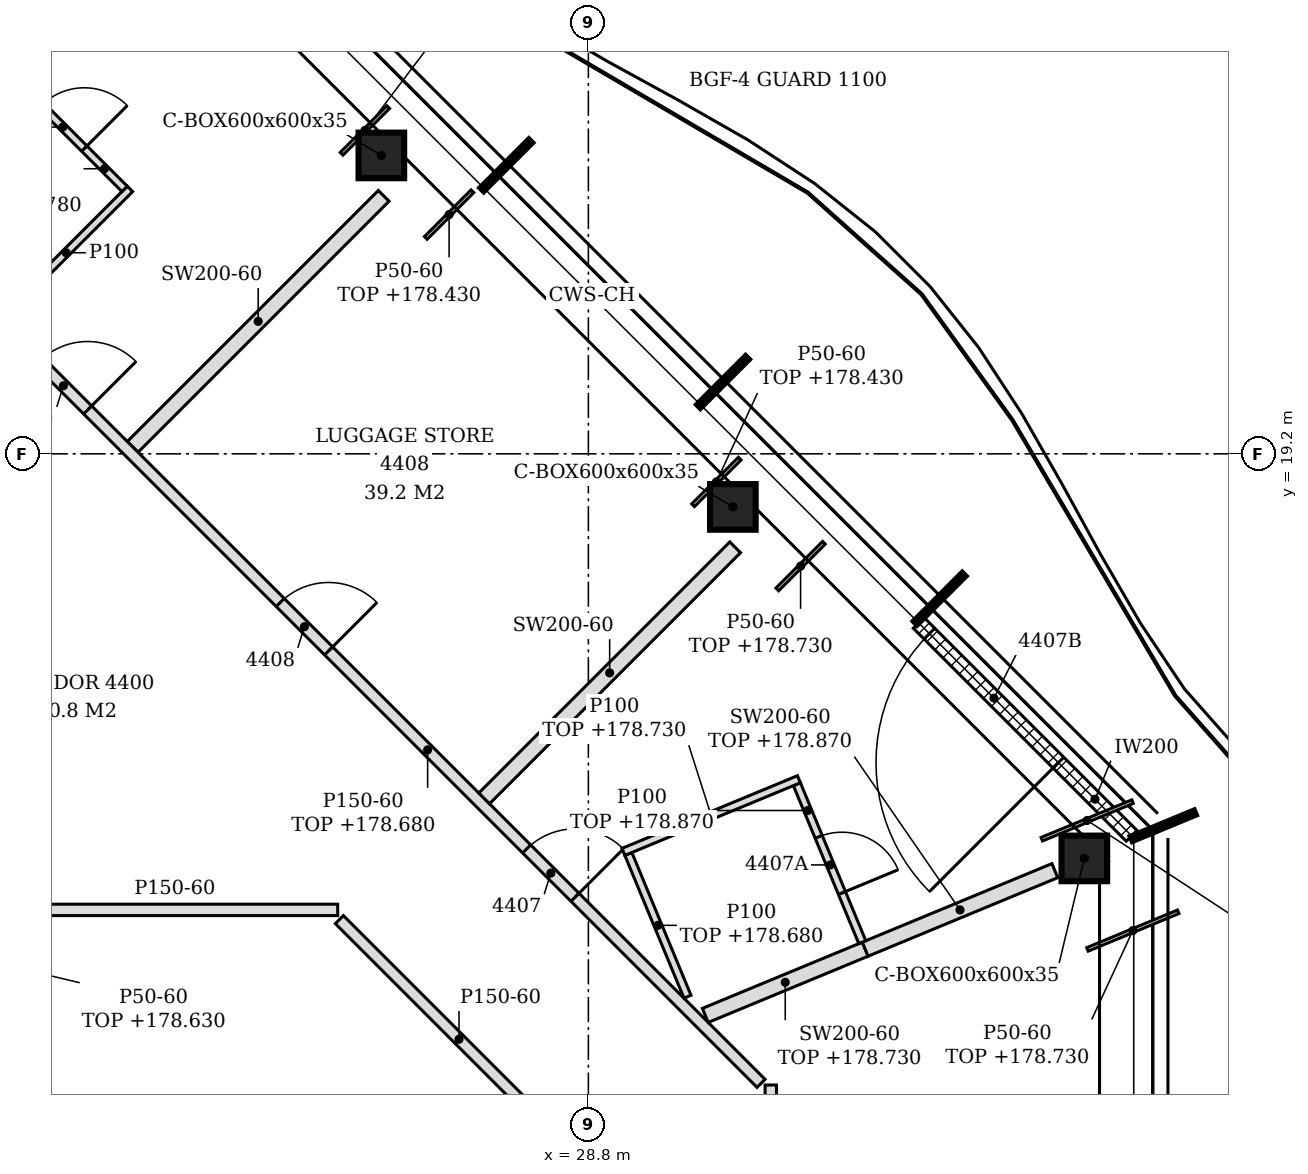
"""IFC4 building model, lengths in metres.
Left out: names, types, materials, properties, quantities, classifications, styles, units other than length and angle.
Written with IfcOpenShell. Run it as: python <this file> out.ifc"""

import sys

from ifc_helpers import new_model, si_unit, direction, frame, frame_2d, origin, origin_2d, place, context, subcontext, project, spatial, rectangle, hollow_rectangle, extrude, clip, halfspace, element, fill, save


model = new_model("IFC4")
c1 = context("Model", 3, precision=1e-05, world=origin(), true_north=direction((0.0, 1.0)))
c2 = subcontext(c1, "Body", "Model", "MODEL_VIEW")
j1 = project(units=[si_unit("LENGTHUNIT", "METRE"), si_unit("PLANEANGLEUNIT", "RADIAN")], contexts=[c1])
p1 = place(None, origin())
s1 = spatial("IfcSite", under=j1, at=p1, CompositionType="ELEMENT")
p2 = place(p1, origin())
s2 = spatial("IfcBuilding", under=s1, at=p2, CompositionType="ELEMENT")
p3 = place(p2, frame((0.0, 0.0, 175.8)))
s3 = spatial("IfcBuildingStorey", under=s2, at=p3, CompositionType="ELEMENT", Elevation=175.8)
for number, where, z_axis, x_axis in (
    (1, (35.325, 13.877, -0.15), (0.183, -0.122, 0.976), (0.555, 0.832, 0.0)),
    (2, (30.701, 18.501, -0.15), (0.183, -0.122, 0.976), (0.555, 0.832, 0.0)),
    (3, (26.076, 23.126, -0.15), (0.183, -0.122, 0.976), (0.555, 0.832, 0.0)),
):
    element("IfcColumn", number, at=place(p3, frame(where, z_axis=z_axis, x_axis=x_axis)), inside=s3, PredefinedType="COLUMN", context=c2, shape_type="Clipping", body=[
        clip(clip(extrude(hollow_rectangle(XDim=0.6, YDim=0.6, WallThickness=0.035, at=origin_2d()), origin(), (0.0, 0.0, 1.0), 3.69), halfspace(frame((0.0, 0.0, 0.022), z_axis=(0.0, 0.0, 1.0), x_axis=(1.0, 0.0, 0.0)), True)), halfspace(frame((0.0, 0.0, 3.67), z_axis=(0.0, 0.0, 1.0), x_axis=(1.0, 0.0, 0.0)), False)),
    ])
p4 = place(p3, frame((35.947, 14.175, 0.0), z_axis=(0.0, 0.0, 1.0), x_axis=(-0.707137595296, 0.707075965734, 0.0)))
e4 = element("IfcWall", 4, at=p4, inside=s3, PredefinedType="NOTDEFINED", context=c2, shape_type="SweptSolid", body=[
    extrude(rectangle(XDim=3.961, YDim=0.2, at=frame_2d((1.981, 0.0))), origin(), (0.0, 0.0, 1.0), 3.45),
])
p5 = place(p4, frame((1.362, 0.0, 0.0)))
e5 = element("IfcOpeningElement", 5, at=p5, cuts=e4, PredefinedType="OPENING", context=c2, shape_type="SweptSolid", body=[
    extrude(rectangle(XDim=2.4, YDim=2.4, at=frame_2d((1.2, 1.2))), frame((0.0, 0.11, 0.0), z_axis=(0.0, -1.0, 0.0), x_axis=(1.0, 0.0, 0.0)), (0.0, 0.0, 1.0), 0.22),
])
p6 = place(p3, frame((31.2, 9.812, 0.0), z_axis=(0.0, 0.0, 1.0), x_axis=(0.0, 1.0, 0.0)))
e6 = element("IfcWall", 6, at=p6, inside=s3, PredefinedType="PARTITIONING", context=c2, shape_type="SweptSolid", body=[
    extrude(rectangle(XDim=1.083, YDim=0.15, at=frame_2d((0.542, 0.0))), origin(), (0.0, 0.0, 1.0), 2.93),
])
p7 = place(p3, frame((28.672, 9.924, 0.0), z_axis=(0.0, 0.0, 1.0), x_axis=(-0.707134199585, 0.707079361725, 0.0)))
e7 = element("IfcWall", 7, at=p7, inside=s3, PredefinedType="PARTITIONING", context=c2, shape_type="SweptSolid", body=[
    extrude(rectangle(XDim=4.452, YDim=0.15, at=frame_2d((2.226, 0.0))), origin(), (0.0, 0.0, 1.0), 3.45),
])
p8 = place(p3, frame((31.072, 10.918, 0.0), z_axis=(0.0, 0.0, 1.0), x_axis=(-0.707106781187, 0.707106781187, 0.0)))
e8 = element("IfcWall", 8, at=p8, inside=s3, PredefinedType="PARTITIONING", context=c2, shape_type="SweptSolid", body=[
    extrude(rectangle(XDim=16.452, YDim=0.15, at=frame_2d((8.226, 0.0))), origin(), (0.0, 0.0, 1.0), 2.88),
])
p9 = place(p8, frame((3.462, 0.0, 0.0)))
e9 = element("IfcOpeningElement", 9, at=p9, cuts=e8, PredefinedType="OPENING", context=c2, shape_type="SweptSolid", body=[
    extrude(rectangle(XDim=0.9, YDim=2.1, at=frame_2d((0.45, 1.05))), frame((0.0, 0.085, 0.0), z_axis=(0.0, -1.0, 0.0), x_axis=(1.0, 0.0, 0.0)), (0.0, 0.0, 1.0), 0.17),
])
p10 = place(p8, frame((8.046, 0.0, 0.0)))
e10 = element("IfcOpeningElement", 10, at=p10, cuts=e8, PredefinedType="OPENING", context=c2, shape_type="SweptSolid", body=[
    extrude(rectangle(XDim=0.9, YDim=2.1, at=frame_2d((0.45, 1.05))), frame((0.0, 0.085, 0.0), z_axis=(0.0, -1.0, 0.0), x_axis=(1.0, 0.0, 0.0)), (0.0, 0.0, 1.0), 0.17),
])
p11 = place(p8, frame((12.53, 0.0, 0.0)))
e11 = element("IfcOpeningElement", 11, at=p11, cuts=e8, PredefinedType="OPENING", context=c2, shape_type="SweptSolid", body=[
    extrude(rectangle(XDim=0.9, YDim=2.1, at=frame_2d((0.45, 1.05))), frame((0.0, 0.085, 0.0), z_axis=(0.0, -1.0, 0.0), x_axis=(1.0, 0.0, 0.0)), (0.0, 0.0, 1.0), 0.17),
])
p12 = place(p3, frame((30.338, 11.812, 0.0), z_axis=(0.0, 0.0, 1.0), x_axis=(0.923912287373, 0.38260434556, 0.0)))
e12 = element("IfcWall", 12, at=p12, inside=s3, PredefinedType="PARTITIONING", context=c2, shape_type="SweptSolid", body=[
    extrude(rectangle(XDim=2.277, YDim=0.2, at=frame_2d((1.138, 0.0))), origin(), (0.0, 0.0, 1.0), 2.93),
])
p13 = place(p3, frame((30.104, 12.058, 0.0), z_axis=(0.0, 0.0, 1.0), x_axis=(-0.382627570994, 0.92390266907, 0.0)))
e13 = element("IfcWall", 13, at=p13, inside=s3, PredefinedType="PARTITIONING", context=c2, shape_type="SweptSolid", body=[
    extrude(rectangle(XDim=2.033, YDim=0.1, at=frame_2d((1.017, 0.0))), origin(), (0.0, 0.0, 1.0), 2.88),
])
p14 = place(p3, frame((32.442, 12.683, 0.0), z_axis=(0.0, 0.0, 1.0), x_axis=(0.923906649102, 0.382617960563, 0.0)))
e14 = element("IfcWall", 14, at=p14, inside=s3, PredefinedType="PARTITIONING", context=c2, shape_type="SweptSolid", body=[
    extrude(rectangle(XDim=2.7, YDim=0.2, at=frame_2d((1.35, 0.0))), origin(), (0.0, 0.0, 1.0), 3.07),
])
p15 = place(p3, frame((32.404, 12.775, 0.0), z_axis=(0.0, 0.0, 1.0), x_axis=(-0.382572259818, 0.923925573852, 0.0)))
e15 = element("IfcWall", 15, at=p15, inside=s3, PredefinedType="PARTITIONING", context=c2, shape_type="SweptSolid", body=[
    extrude(rectangle(XDim=2.25, YDim=0.1, at=frame_2d((1.125, 0.0))), origin(), (0.0, 0.0, 1.0), 3.07),
])
p16 = place(p15, frame((0.7, 0.0, 0.0)))
e16 = element("IfcOpeningElement", 16, at=p16, cuts=e15, PredefinedType="OPENING", context=c2, shape_type="SweptSolid", body=[
    extrude(rectangle(XDim=0.8, YDim=2.1, at=frame_2d((0.4, 1.05))), frame((0.0, 0.06, 0.0), z_axis=(0.0, -1.0, 0.0), x_axis=(1.0, 0.0, 0.0)), (0.0, 0.0, 1.0), 0.12),
])
p17 = place(p3, frame((21.215, 13.2, 0.0), z_axis=(0.0, 0.0, 1.0), x_axis=(1.0, 0.0, 0.0)))
e17 = element("IfcWall", 17, at=p17, inside=s3, PredefinedType="PARTITIONING", context=c2, shape_type="SweptSolid", body=[
    extrude(rectangle(XDim=4.287, YDim=0.15, at=frame_2d((2.144, 0.0))), origin(), (0.0, 0.0, 1.0), 3.45),
])
p18 = place(p3, frame((29.261, 13.963, 0.0), z_axis=(0.0, 0.0, 1.0), x_axis=(0.923929949387, 0.382561692574, 0.0)))
e18 = element("IfcWall", 18, at=p18, inside=s3, PredefinedType="PARTITIONING", context=c2, shape_type="SweptSolid", body=[
    extrude(rectangle(XDim=2.5, YDim=0.1, at=frame_2d((1.25, 0.0))), origin(), (0.0, 0.0, 1.0), 2.93),
])
for number, where, z_axis, x_axis in (
    (19, (27.429, 14.667, 0.0), (0.0, 0.0, 1.0), (0.707, 0.707, 0.0)),
    (20, (22.805, 19.291, 0.0), (0.0, 0.0, 1.0), (0.707, 0.707, 0.0)),
):
    element("IfcWall", number, at=place(p3, frame(where, z_axis=z_axis, x_axis=x_axis)), inside=s3, PredefinedType="PARTITIONING", context=c2, shape_type="SweptSolid", body=[
        extrude(rectangle(XDim=4.671, YDim=0.2, at=frame_2d((2.335, 0.0))), origin(), (0.0, 0.0, 1.0), 3.45),
    ])
p19 = place(p3, frame((21.09, 21.006, 0.0), z_axis=(0.0, 0.0, 1.0), x_axis=(0.707106781187, 0.707106781187, 0.0)))
e21 = element("IfcWall", 21, at=p19, inside=s3, PredefinedType="PARTITIONING", context=c2, shape_type="SweptSolid", body=[
    extrude(rectangle(XDim=2.375, YDim=0.1, at=frame_2d((1.188, 0.0))), origin(), (0.0, 0.0, 1.0), 3.45),
])
p20 = place(p3, frame((22.698, 22.685, 0.0), z_axis=(0.0, 0.0, 1.0), x_axis=(-0.707053697085, 0.707159861304, 0.0)))
e22 = element("IfcWall", 22, at=p20, inside=s3, PredefinedType="PARTITIONING", context=c2, shape_type="SweptSolid", body=[
    extrude(rectangle(XDim=2.3, YDim=0.1, at=frame_2d((1.15, 0.0))), origin(), (0.0, 0.0, 1.0), 2.98),
])
p21 = place(p20, frame((0.75, 0.0, 0.0)))
e23 = element("IfcOpeningElement", 23, at=p21, cuts=e22, PredefinedType="OPENING", context=c2, shape_type="SweptSolid", body=[
    extrude(rectangle(XDim=0.8, YDim=2.1, at=frame_2d((0.4, 1.05))), frame((0.0, 0.06, 0.0), z_axis=(0.0, -1.0, 0.0), x_axis=(1.0, 0.0, 0.0)), (0.0, 0.0, 1.0), 0.12),
])
for number, where, z_axis, x_axis in (
    (24, (35.366, 12.68, 0.0), (0.0, 0.0, 1.0), (0.924, 0.383, 0.0)),
    (25, (34.765, 14.13, 0.0), (0.0, 0.0, 1.0), (0.924, 0.383, 0.0)),
):
    element("IfcWall", number, at=place(p3, frame(where, z_axis=z_axis, x_axis=x_axis)), inside=s3, PredefinedType="PARTITIONING", context=c2, shape_type="SweptSolid", body=[
        extrude(rectangle(XDim=1.292, YDim=0.05, at=frame_2d((0.646, 0.0))), origin(), (0.0, 0.0, 1.0), 2.93),
    ])
p22 = place(p3, frame((31.285, 17.416, 0.0), z_axis=(0.0, 0.0, 1.0), x_axis=(0.706966105416, 0.707247428976, 0.0)))
e26 = element("IfcWall", 26, at=p22, inside=s3, PredefinedType="PARTITIONING", context=c2, shape_type="SweptSolid", body=[
    extrude(rectangle(XDim=0.868, YDim=0.05, at=frame_2d((0.434, 0.0))), origin(), (0.0, 0.0, 1.0), 2.93),
])
p23 = place(p3, frame((30.177, 18.523, 0.0), z_axis=(0.0, 0.0, 1.0), x_axis=(0.706966161367, 0.707247373047, 0.0)))
e27 = element("IfcWall", 27, at=p23, inside=s3, PredefinedType="PARTITIONING", context=c2, shape_type="SweptSolid", body=[
    extrude(rectangle(XDim=0.868, YDim=0.05, at=frame_2d((0.434, 0.0))), origin(), (0.0, 0.0, 1.0), 2.63),
])
p24 = place(p3, frame((25.553, 23.147, 0.0), z_axis=(0.0, 0.0, 1.0), x_axis=(0.706966105416, 0.707247428976, 0.0)))
e28 = element("IfcWall", 28, at=p24, inside=s3, PredefinedType="PARTITIONING", context=c2, shape_type="SweptSolid", body=[
    extrude(rectangle(XDim=0.868, YDim=0.05, at=frame_2d((0.434, 0.0))), origin(), (0.0, 0.0, 1.0), 2.93),
])
p25 = place(p3, frame((26.661, 22.04, 0.0), z_axis=(0.0, 0.0, 1.0), x_axis=(0.707106781187, 0.707106781187, 0.0)))
e29 = element("IfcWall", 29, at=p25, inside=s3, PredefinedType="PARTITIONING", context=c2, shape_type="SweptSolid", body=[
    extrude(rectangle(XDim=0.868, YDim=0.05, at=frame_2d((0.434, 0.0))), origin(), (0.0, 0.0, 1.0), 2.63),
])
p26 = place(p5, origin())
e30 = element("IfcDoor", 30, at=p26, inside=s3, OperationType="SINGLE_SWING_LEFT", PredefinedType="DOOR", context=c2, shape_type="SweptSolid", body=[
    extrude(rectangle(XDim=2.4, YDim=2.4, at=frame_2d((1.2, 1.2))), frame((0.0, 0.025, 0.0), z_axis=(0.0, -1.0, 0.0), x_axis=(1.0, 0.0, 0.0)), (0.0, 0.0, 1.0), 0.05),
])
fill(e5, e30)
p27 = place(p9, frame((0.9, 0.0, 0.0), z_axis=(0.0, 0.0, 1.0), x_axis=(-1.0, 0.0, 0.0)))
e31 = element("IfcDoor", 31, at=p27, inside=s3, OperationType="SINGLE_SWING_RIGHT", PredefinedType="DOOR", context=c2, shape_type="SweptSolid", body=[
    extrude(rectangle(XDim=0.9, YDim=2.1, at=frame_2d((0.45, 1.05))), frame((0.0, 0.025, 0.0), z_axis=(0.0, -1.0, 0.0), x_axis=(1.0, 0.0, 0.0)), (0.0, 0.0, 1.0), 0.05),
])
fill(e9, e31)
p28 = place(p16, frame((0.8, 0.0, 0.0), z_axis=(0.0, 0.0, 1.0), x_axis=(-1.0, 0.0, 0.0)))
e32 = element("IfcDoor", 32, at=p28, inside=s3, OperationType="SINGLE_SWING_RIGHT", PredefinedType="DOOR", context=c2, shape_type="SweptSolid", body=[
    extrude(rectangle(XDim=0.8, YDim=2.1, at=frame_2d((0.4, 1.05))), frame((0.0, 0.025, 0.0), z_axis=(0.0, -1.0, 0.0), x_axis=(1.0, 0.0, 0.0)), (0.0, 0.0, 1.0), 0.05),
])
fill(e16, e32)
p29 = place(p10, frame((0.9, 0.0, 0.0), z_axis=(0.0, 0.0, 1.0), x_axis=(-1.0, 0.0, 0.0)))
e33 = element("IfcDoor", 33, at=p29, inside=s3, OperationType="SINGLE_SWING_RIGHT", PredefinedType="DOOR", context=c2, shape_type="SweptSolid", body=[
    extrude(rectangle(XDim=0.9, YDim=2.1, at=frame_2d((0.45, 1.05))), frame((0.0, 0.025, 0.0), z_axis=(0.0, -1.0, 0.0), x_axis=(1.0, 0.0, 0.0)), (0.0, 0.0, 1.0), 0.05),
])
fill(e10, e33)
p30 = place(p11, frame((0.9, 0.0, 0.0), z_axis=(0.0, 0.0, 1.0), x_axis=(-1.0, 0.0, 0.0)))
e34 = element("IfcDoor", 34, at=p30, inside=s3, OperationType="SINGLE_SWING_RIGHT", PredefinedType="DOOR", context=c2, shape_type="SweptSolid", body=[
    extrude(rectangle(XDim=0.9, YDim=2.1, at=frame_2d((0.45, 1.05))), frame((0.0, 0.025, 0.0), z_axis=(0.0, -1.0, 0.0), x_axis=(1.0, 0.0, 0.0)), (0.0, 0.0, 1.0), 0.05),
])
fill(e11, e34)
p31 = place(p21, frame((0.8, 0.0, 0.0), z_axis=(0.0, 0.0, 1.0), x_axis=(-1.0, 0.0, 0.0)))
e35 = element("IfcDoor", 35, at=p31, inside=s3, OperationType="SINGLE_SWING_RIGHT", PredefinedType="DOOR", context=c2, shape_type="SweptSolid", body=[
    extrude(rectangle(XDim=0.8, YDim=2.1, at=frame_2d((0.4, 1.05))), frame((0.0, 0.025, 0.0), z_axis=(0.0, -1.0, 0.0), x_axis=(1.0, 0.0, 0.0)), (0.0, 0.0, 1.0), 0.05),
])
fill(e23, e35)
save(model, sys.argv[1])
